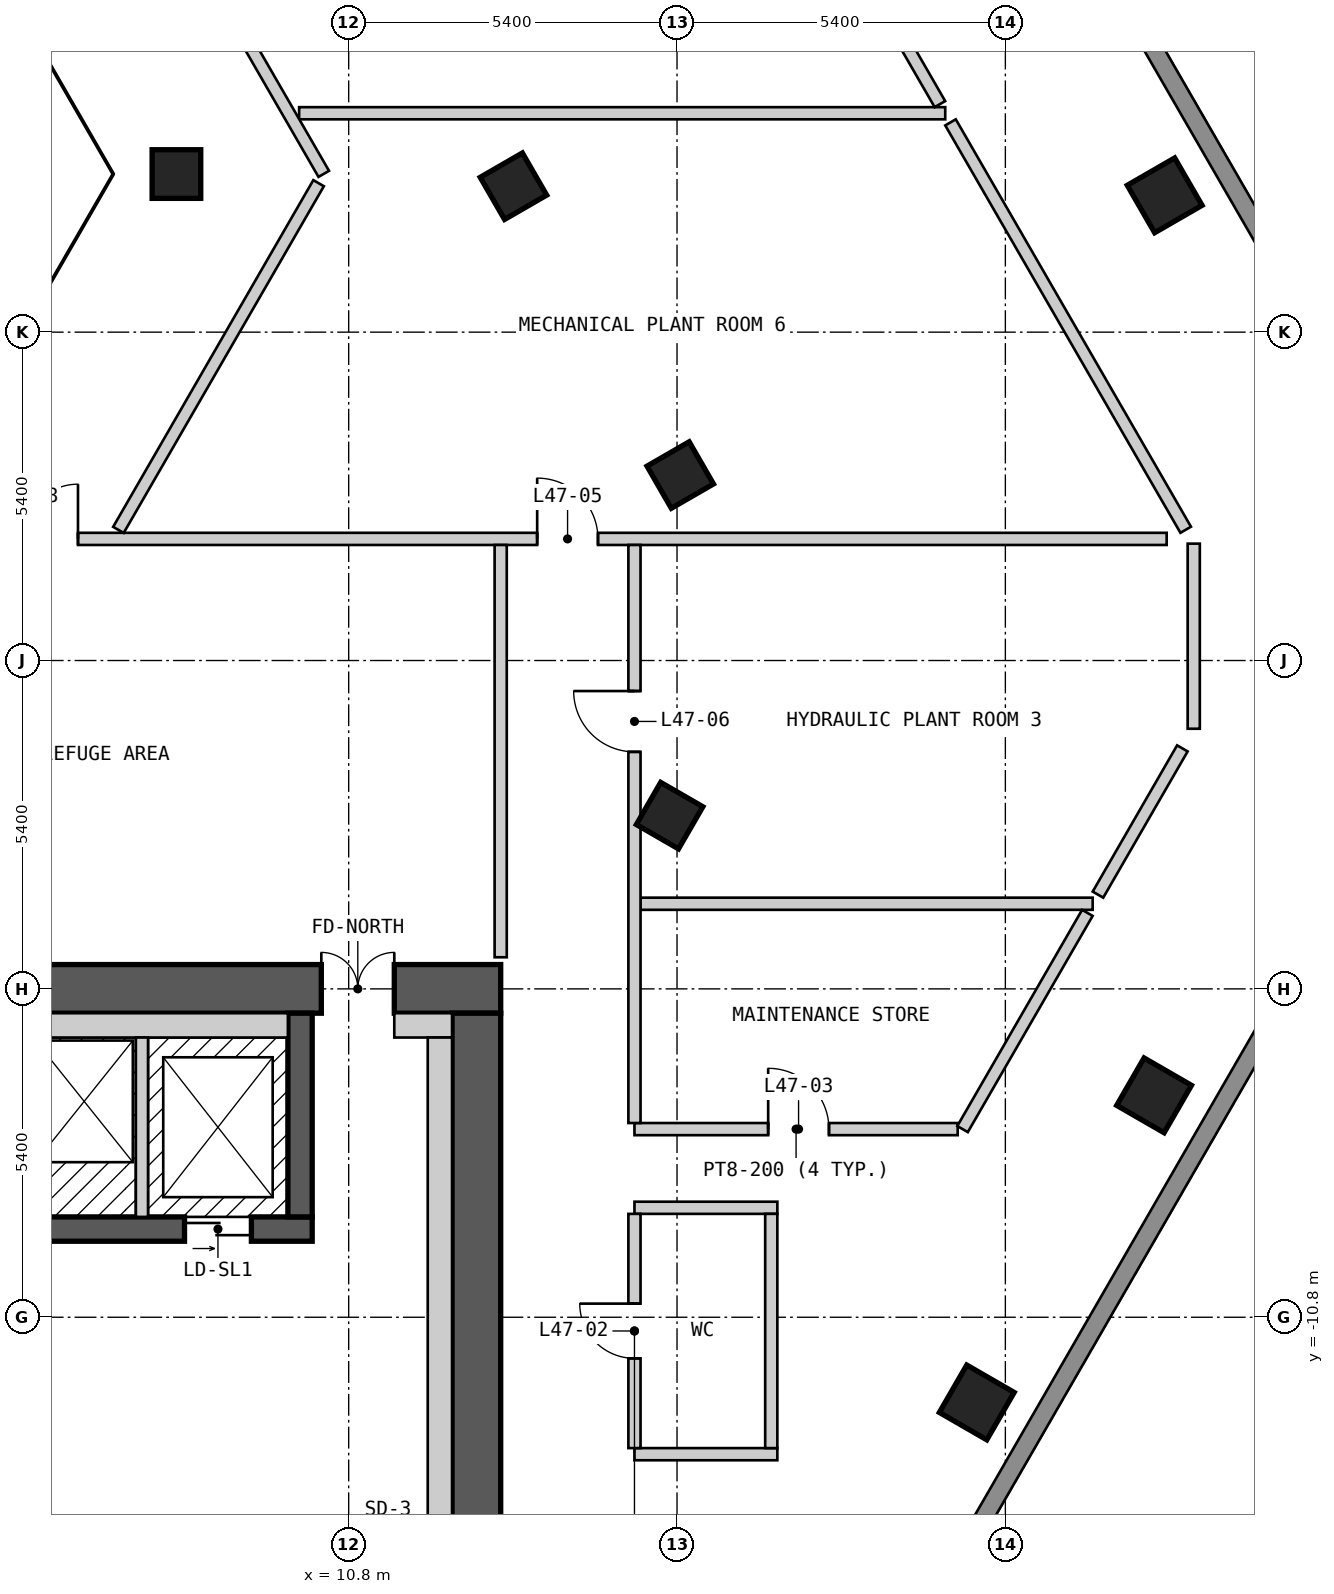
"""IFC4 building model, lengths in metres.
Left out: names, types, materials, properties, quantities, classifications, styles, units other than length and angle.
Written with IfcOpenShell. Run it as: python <this file> out.ifc"""

import sys

from ifc_helpers import new_model, si_unit, direction, frame, frame_2d, origin, origin_2d, place, context, subcontext, project, spatial, polyline, rectangle, outline, extrude, element, fill, save


model = new_model("IFC4")
c1 = context("Model", 3, precision=1e-05, world=origin(), true_north=direction((0.0, 1.0)))
c2 = subcontext(c1, "Body", "Model", "MODEL_VIEW")
j1 = project(units=[si_unit("LENGTHUNIT", "METRE"), si_unit("PLANEANGLEUNIT", "RADIAN")], contexts=[c1])
p1 = place(None, origin())
s1 = spatial("IfcSite", under=j1, at=p1, CompositionType="ELEMENT")
p2 = place(p1, origin())
s2 = spatial("IfcBuilding", under=s1, at=p2, CompositionType="ELEMENT")
p3 = place(p2, frame((0.0, 0.0, 153.6)))
s3 = spatial("IfcBuildingStorey", under=s2, at=p3, CompositionType="ELEMENT", Elevation=153.6)
for number, where, z_axis, x_axis in (
    (1, (21.13, -12.201, 0.0), (0.0, 0.0, 1.0), (0.5, 0.866, 0.0)),
    (2, (24.046, -7.151, 0.0), (0.0, 0.0, 1.0), (0.5, 0.866, 0.0)),
):
    element("IfcColumn", number, at=place(p3, frame(where, z_axis=z_axis, x_axis=x_axis)), inside=s3, PredefinedType="COLUMN", context=c2, shape_type="SweptSolid", body=[
        extrude(rectangle(XDim=0.9, YDim=0.9, at=origin_2d()), origin(), (0.0, 0.0, 1.0), 2.6),
    ])
p4 = place(p3, frame((24.22, 7.65, 0.0), z_axis=(0.0, 0.0, 1.0), x_axis=(-0.5, 0.866025403784, 0.0)))
e3 = element("IfcColumn", 3, at=p4, inside=s3, PredefinedType="COLUMN", context=c2, shape_type="SweptSolid", body=[
    extrude(rectangle(XDim=0.9, YDim=0.9, at=origin_2d()), origin(), (0.0, 0.0, 1.0), 3.6),
])
for number, where, z_axis, x_axis in (
    (4, (16.078, -2.551, 0.0), (0.0, 0.0, 1.0), (0.5, 0.866, 0.0)),
    (5, (16.253, 3.05, 0.0), (0.0, 0.0, 1.0), (-0.5, 0.866, 0.0)),
    (6, (13.51, 7.8, 0.0), (0.0, 0.0, 1.0), (-0.5, 0.866, 0.0)),
    (7, (7.967, 8.0, 0.0), (0.0, 0.0, 1.0), (1.0, 0.0, 0.0)),
):
    element("IfcColumn", number, at=place(p3, frame(where, z_axis=z_axis, x_axis=x_axis)), inside=s3, PredefinedType="COLUMN", context=c2, shape_type="SweptSolid", body=[
        extrude(rectangle(XDim=0.8, YDim=0.8, at=origin_2d()), origin(), (0.0, 0.0, 1.0), 3.6),
    ])
p5 = place(p3, frame((-13.3, -5.4, 0.0), z_axis=(0.0, 0.0, 1.0), x_axis=(1.0, 0.0, 0.0)))
e8 = element("IfcWall", 8, at=p5, inside=s3, PredefinedType="SHEAR", context=c2, shape_type="SweptSolid", body=[
    extrude(rectangle(XDim=26.6, YDim=0.8, at=frame_2d((13.3, 0.0))), origin(), (0.0, 0.0, 1.0), 2.6),
])
p6 = place(p5, frame((23.65, 0.0, 0.0)))
e9 = element("IfcOpeningElement", 9, at=p6, cuts=e8, PredefinedType="OPENING", context=c2, shape_type="SweptSolid", body=[
    extrude(rectangle(XDim=1.2, YDim=2.1, at=frame_2d((0.6, 1.05))), frame((0.0, 0.41, 0.0), z_axis=(0.0, -1.0, 0.0), x_axis=(1.0, 0.0, 0.0)), (0.0, 0.0, 1.0), 0.82),
])
p7 = place(p3, frame((12.9, -18.2, 0.0), z_axis=(0.0, 0.0, 1.0), x_axis=(0.0, 1.0, 0.0)))
e10 = element("IfcWall", 10, at=p7, inside=s3, PredefinedType="SHEAR", context=c2, shape_type="SweptSolid", body=[
    extrude(rectangle(XDim=12.4, YDim=0.8, at=frame_2d((6.2, 0.0))), origin(), (0.0, 0.0, 1.0), 2.6),
])
p8 = place(p3, frame((-12.5, -9.35, 0.0), z_axis=(0.0, 0.0, 1.0), x_axis=(1.0, 0.0, 0.0)))
e11 = element("IfcWall", 11, at=p8, inside=s3, PredefinedType="SHEAR", context=c2, shape_type="SweptSolid", body=[
    extrude(rectangle(XDim=22.7, YDim=0.4, at=frame_2d((11.35, 0.0))), origin(), (0.0, 0.0, 1.0), 2.6),
])
p9 = place(p8, frame((1.1, 0.0, 0.0)))
e12 = element("IfcOpeningElement", 12, at=p9, cuts=e11, PredefinedType="OPENING", context=c2, shape_type="SweptSolid", body=[
    extrude(rectangle(XDim=1.1, YDim=2.1, at=frame_2d((0.55, 1.05))), frame((0.0, 0.21, 0.0), z_axis=(0.0, -1.0, 0.0), x_axis=(1.0, 0.0, 0.0)), (0.0, 0.0, 1.0), 0.42),
])
p10 = place(p8, frame((3.9, 0.0, 0.0)))
e13 = element("IfcOpeningElement", 13, at=p10, cuts=e11, PredefinedType="OPENING", context=c2, shape_type="SweptSolid", body=[
    extrude(rectangle(XDim=1.1, YDim=2.1, at=frame_2d((0.55, 1.05))), frame((0.0, 0.21, 0.0), z_axis=(0.0, -1.0, 0.0), x_axis=(1.0, 0.0, 0.0)), (0.0, 0.0, 1.0), 0.42),
])
p11 = place(p8, frame((20.6, 0.0, 0.0)))
e14 = element("IfcOpeningElement", 14, at=p11, cuts=e11, PredefinedType="OPENING", context=c2, shape_type="SweptSolid", body=[
    extrude(rectangle(XDim=1.1, YDim=2.1, at=frame_2d((0.55, 1.05))), frame((0.0, 0.21, 0.0), z_axis=(0.0, -1.0, 0.0), x_axis=(1.0, 0.0, 0.0)), (0.0, 0.0, 1.0), 0.42),
])
p12 = place(p3, frame((10.0, -9.15, 0.0), z_axis=(0.0, 0.0, 1.0), x_axis=(0.0, 1.0, 0.0)))
e15 = element("IfcWall", 15, at=p12, inside=s3, PredefinedType="SHEAR", context=c2, shape_type="SweptSolid", body=[
    extrude(rectangle(XDim=3.35, YDim=0.4, at=frame_2d((1.675, 0.0))), origin(), (0.0, 0.0, 1.0), 2.6),
])
p13 = place(p3, frame((15.862, -23.425, 0.0), z_axis=(0.0, 0.0, 1.0), x_axis=(0.500017503135, 0.866015298109, 0.0)))
e16 = element("IfcWall", 16, at=p13, inside=s3, PredefinedType="SOLIDWALL", context=c2, shape_type="SweptSolid", body=[
    extrude(outline(polyline([(0.0, -0.15), (24.711, -0.15), (24.631, 0.15), (0.08, 0.15), (0.0, -0.15)])), origin(), (0.0, 0.0, 1.0), 2.6),
])
p14 = place(p3, frame((28.218, 2.825, 0.0), z_axis=(0.0, 0.0, 1.0), x_axis=(-0.500020536353, 0.866013546791, 0.0)))
e17 = element("IfcWall", 17, at=p14, inside=s3, PredefinedType="SOLIDWALL", context=c2, shape_type="SweptSolid", body=[
    extrude(outline(polyline([(0.0, -0.15), (23.325, -0.15), (23.245, 0.15), (0.08, 0.15), (0.0, -0.15)])), origin(), (0.0, 0.0, 1.0), 2.6),
])
for number, where, z_axis, x_axis in (
    (18, (15.5, -13.052, 0.0), (0.0, 0.0, 1.0), (1.0, 0.0, 0.0)),
    (19, (15.5, -9.0, 0.0), (0.0, 0.0, 1.0), (1.0, 0.0, 0.0)),
):
    element("IfcWall", number, at=place(p3, frame(where, z_axis=z_axis, x_axis=x_axis)), inside=s3, PredefinedType="PARTITIONING", context=c2, shape_type="SweptSolid", body=[
        extrude(rectangle(XDim=2.35, YDim=0.2, at=frame_2d((1.175, 0.0))), origin(), (0.0, 0.0, 1.0), 2.6),
    ])
p15 = place(p3, frame((15.5, -7.706, 0.0), z_axis=(0.0, 0.0, 1.0), x_axis=(1.0, 0.0, 0.0)))
e20 = element("IfcWall", 20, at=p15, inside=s3, PredefinedType="PARTITIONING", context=c2, shape_type="SweptSolid", body=[
    extrude(rectangle(XDim=5.316, YDim=0.2, at=frame_2d((2.658, 0.0))), origin(), (0.0, 0.0, 1.0), 2.6),
])
p16 = place(p15, frame((2.199, 0.0, 0.0)))
e21 = element("IfcOpeningElement", 21, at=p16, cuts=e20, PredefinedType="OPENING", context=c2, shape_type="SweptSolid", body=[
    extrude(rectangle(XDim=1.0, YDim=2.1, at=frame_2d((0.5, 1.05))), frame((0.0, 0.11, 0.0), z_axis=(0.0, -1.0, 0.0), x_axis=(1.0, 0.0, 0.0)), (0.0, 0.0, 1.0), 0.22),
])
p17 = place(p3, frame((15.6, -4.0, 0.0), z_axis=(0.0, 0.0, 1.0), x_axis=(1.0, 0.0, 0.0)))
e22 = element("IfcWall", 22, at=p17, inside=s3, PredefinedType="SOLIDWALL", context=c2, shape_type="SweptSolid", body=[
    extrude(rectangle(XDim=7.436, YDim=0.2, at=frame_2d((3.718, 0.0))), origin(), (0.0, 0.0, 1.0), 2.6),
])
p18 = place(p3, frame((-24.253, 2.0, 0.0), z_axis=(0.0, 0.0, 1.0), x_axis=(1.0, 0.0, 0.0)))
e23 = element("IfcWall", 23, at=p18, inside=s3, PredefinedType="SOLIDWALL", context=c2, shape_type="SweptSolid", body=[
    extrude(rectangle(XDim=48.506, YDim=0.2, at=frame_2d((24.253, 0.0))), origin(), (0.0, 0.0, 1.0), 2.6),
])
p19 = place(p18, frame((38.153, 0.0, 0.0)))
e24 = element("IfcOpeningElement", 24, at=p19, cuts=e23, PredefinedType="OPENING", context=c2, shape_type="SweptSolid", body=[
    extrude(rectangle(XDim=1.0, YDim=2.1, at=frame_2d((0.5, 1.05))), frame((0.0, 0.11, 0.0), z_axis=(0.0, -1.0, 0.0), x_axis=(1.0, 0.0, 0.0)), (0.0, 0.0, 1.0), 0.22),
])
p20 = place(p18, frame((28.801, 0.0, 0.0)))
e25 = element("IfcOpeningElement", 25, at=p20, cuts=e23, PredefinedType="OPENING", context=c2, shape_type="SweptSolid", body=[
    extrude(rectangle(XDim=1.8, YDim=2.1, at=frame_2d((0.9, 1.05))), frame((0.0, 0.11, 0.0), z_axis=(0.0, -1.0, 0.0), x_axis=(1.0, 0.0, 0.0)), (0.0, 0.0, 1.0), 0.22),
])
p21 = place(p3, frame((9.985, 9.0, 0.0), z_axis=(0.0, 0.0, 1.0), x_axis=(1.0, 0.0, 0.0)))
e26 = element("IfcWall", 26, at=p21, inside=s3, PredefinedType="SOLIDWALL", context=c2, shape_type="SweptSolid", body=[
    extrude(rectangle(XDim=10.626, YDim=0.2, at=frame_2d((5.313, 0.0))), origin(), (0.0, 0.0, 1.0), 2.6),
])
p22 = place(p3, frame((13.3, -4.88, 0.0), z_axis=(0.0, 0.0, 1.0), x_axis=(0.0, 1.0, 0.0)))
e27 = element("IfcWall", 27, at=p22, inside=s3, PredefinedType="PARTITIONING", context=c2, shape_type="SweptSolid", body=[
    extrude(rectangle(XDim=6.78, YDim=0.2, at=frame_2d((3.39, 0.0))), origin(), (0.0, 0.0, 1.0), 2.6),
])
p23 = place(p3, frame((15.5, -12.952, 0.0), z_axis=(0.0, 0.0, 1.0), x_axis=(0.0, 1.0, 0.0)))
e28 = element("IfcWall", 28, at=p23, inside=s3, PredefinedType="PARTITIONING", context=c2, shape_type="SweptSolid", body=[
    extrude(rectangle(XDim=3.852, YDim=0.2, at=frame_2d((1.926, 0.0))), origin(), (0.0, 0.0, 1.0), 2.6),
])
p24 = place(p23, frame((2.376, 0.0, 0.0), z_axis=(0.0, 0.0, 1.0), x_axis=(-1.0, 0.0, 0.0)))
e29 = element("IfcOpeningElement", 29, at=p24, cuts=e28, PredefinedType="OPENING", context=c2, shape_type="SweptSolid", body=[
    extrude(rectangle(XDim=0.9, YDim=2.1, at=frame_2d((0.45, 1.05))), frame((0.0, 0.11, 0.0), z_axis=(0.0, -1.0, 0.0), x_axis=(1.0, 0.0, 0.0)), (0.0, 0.0, 1.0), 0.22),
])
p25 = place(p3, frame((15.5, -7.606, 0.0), z_axis=(0.0, 0.0, 1.0), x_axis=(0.0, 1.0, 0.0)))
e30 = element("IfcWall", 30, at=p25, inside=s3, PredefinedType="SOLIDWALL", context=c2, shape_type="SweptSolid", body=[
    extrude(rectangle(XDim=9.506, YDim=0.2, at=frame_2d((4.753, 0.0))), origin(), (0.0, 0.0, 1.0), 2.6),
])
p26 = place(p25, frame((7.104, 0.0, 0.0), z_axis=(0.0, 0.0, 1.0), x_axis=(-1.0, 0.0, 0.0)))
e31 = element("IfcOpeningElement", 31, at=p26, cuts=e30, PredefinedType="OPENING", context=c2, shape_type="SweptSolid", body=[
    extrude(rectangle(XDim=1.0, YDim=2.1, at=frame_2d((0.5, 1.05))), frame((0.0, 0.11, 0.0), z_axis=(0.0, -1.0, 0.0), x_axis=(1.0, 0.0, 0.0)), (0.0, 0.0, 1.0), 0.22),
])
p27 = place(p3, frame((17.75, -12.952, 0.0), z_axis=(0.0, 0.0, 1.0), x_axis=(0.0, 1.0, 0.0)))
e32 = element("IfcWall", 32, at=p27, inside=s3, PredefinedType="PARTITIONING", context=c2, shape_type="SweptSolid", body=[
    extrude(rectangle(XDim=3.852, YDim=0.2, at=frame_2d((1.926, 0.0))), origin(), (0.0, 0.0, 1.0), 2.6),
])
p28 = place(p3, frame((24.698, -1.122, 0.0), z_axis=(0.0, 0.0, 1.0), x_axis=(0.0, 1.0, 0.0)))
e33 = element("IfcWall", 33, at=p28, inside=s3, PredefinedType="SOLIDWALL", context=c2, shape_type="SweptSolid", body=[
    extrude(rectangle(XDim=3.044, YDim=0.2, at=frame_2d((1.522, 0.0))), origin(), (0.0, 0.0, 1.0), 2.6),
])
p29 = place(p3, frame((5.196, 17.0, 0.0), z_axis=(0.0, 0.0, 1.0), x_axis=(0.499955721747, -0.866050966336, 0.0)))
e34 = element("IfcWall", 34, at=p29, inside=s3, PredefinedType="SOLIDWALL", context=c2, shape_type="SweptSolid", body=[
    extrude(rectangle(XDim=10.389, YDim=0.2, at=frame_2d((5.194, 0.0))), origin(), (0.0, 0.0, 1.0), 2.6),
])
p30 = place(p3, frame((14.2, 20.105, 0.0), z_axis=(0.0, 0.0, 1.0), x_axis=(0.499944105132, -0.866057672296, 0.0)))
e35 = element("IfcWall", 35, at=p30, inside=s3, PredefinedType="SOLIDWALL", context=c2, shape_type="SweptSolid", body=[
    extrude(rectangle(XDim=12.649, YDim=0.2, at=frame_2d((6.325, 0.0))), origin(), (0.0, 0.0, 1.0), 2.6),
])
p31 = place(p3, frame((20.698, 8.85, 0.0), z_axis=(0.0, 0.0, 1.0), x_axis=(0.499957378818, -0.866050009737, 0.0)))
e36 = element("IfcWall", 36, at=p31, inside=s3, PredefinedType="SOLIDWALL", context=c2, shape_type="SweptSolid", body=[
    extrude(rectangle(XDim=7.737, YDim=0.2, at=frame_2d((3.868, 0.0))), origin(), (0.0, 0.0, 1.0), 2.6),
])
p32 = place(p3, frame((20.896, -7.706, 0.0), z_axis=(0.0, 0.0, 1.0), x_axis=(0.499969497581, 0.866043013648, 0.0)))
e37 = element("IfcWall", 37, at=p32, inside=s3, PredefinedType="PARTITIONING", context=c2, shape_type="SweptSolid", body=[
    extrude(rectangle(XDim=4.106, YDim=0.2, at=frame_2d((2.053, 0.0))), origin(), (0.0, 0.0, 1.0), 2.6),
])
p33 = place(p3, frame((23.123, -3.85, 0.0), z_axis=(0.0, 0.0, 1.0), x_axis=(0.499836620903, 0.866119710204, 0.0)))
e38 = element("IfcWall", 38, at=p33, inside=s3, PredefinedType="SOLIDWALL", context=c2, shape_type="SweptSolid", body=[
    extrude(rectangle(XDim=2.777, YDim=0.2, at=frame_2d((1.388, 0.0))), origin(), (0.0, 0.0, 1.0), 2.6),
])
p34 = place(p3, frame((7.013, 2.148, 0.0), z_axis=(0.0, 0.0, 1.0), x_axis=(0.499983511822, 0.866034923029, 0.0)))
e39 = element("IfcWall", 39, at=p34, inside=s3, PredefinedType="SOLIDWALL", context=c2, shape_type="SweptSolid", body=[
    extrude(rectangle(XDim=6.584, YDim=0.2, at=frame_2d((3.292, 0.0))), origin(), (0.0, 0.0, 1.0), 2.6),
])
p35 = place(p3, frame((-6.3, -6.0, 0.0), z_axis=(0.0, 0.0, 1.0), x_axis=(1.0, 0.0, 0.0)))
e40 = element("IfcWall", 40, at=p35, inside=s3, PredefinedType="SOLIDWALL", context=c2, shape_type="SweptSolid", body=[
    extrude(rectangle(XDim=16.1, YDim=0.4, at=frame_2d((8.05, 0.0))), origin(), (0.0, 0.0, 1.0), 2.6),
])
p36 = place(p3, frame((7.4, -9.15, 0.0), z_axis=(0.0, 0.0, 1.0), x_axis=(0.0, 1.0, 0.0)))
e41 = element("IfcWall", 41, at=p36, inside=s3, PredefinedType="SOLIDWALL", context=c2, shape_type="SweptSolid", body=[
    extrude(rectangle(XDim=2.95, YDim=0.2, at=frame_2d((1.475, 0.0))), origin(), (0.0, 0.0, 1.0), 2.6),
])
p37 = place(p3, frame((11.55, -6.0, 0.0), z_axis=(0.0, 0.0, 1.0), x_axis=(1.0, 0.0, 0.0)))
e42 = element("IfcWall", 42, at=p37, inside=s3, PredefinedType="PARTITIONING", context=c2, shape_type="SweptSolid", body=[
    extrude(rectangle(XDim=0.95, YDim=0.4, at=frame_2d((0.475, 0.0))), origin(), (0.0, 0.0, 1.0), 2.6),
])
p38 = place(p3, frame((12.3, -14.45, 0.0), z_axis=(0.0, 0.0, 1.0), x_axis=(0.0, 1.0, 0.0)))
e43 = element("IfcWall", 43, at=p38, inside=s3, PredefinedType="PARTITIONING", context=c2, shape_type="SweptSolid", body=[
    extrude(rectangle(XDim=8.25, YDim=0.4, at=frame_2d((4.125, 0.0))), origin(), (0.0, 0.0, 1.0), 2.6),
])
p39 = place(p24, origin())
e44 = element("IfcDoor", 44, at=p39, inside=s3, OperationType="SINGLE_SWING_LEFT", PredefinedType="DOOR", context=c2, shape_type="SweptSolid", body=[
    extrude(rectangle(XDim=0.9, YDim=2.1, at=frame_2d((0.45, 1.05))), frame((0.0, 0.025, 0.0), z_axis=(0.0, -1.0, 0.0), x_axis=(1.0, 0.0, 0.0)), (0.0, 0.0, 1.0), 0.05),
])
fill(e29, e44)
p40 = place(p16, origin())
e45 = element("IfcDoor", 45, at=p40, inside=s3, OperationType="SINGLE_SWING_LEFT", PredefinedType="DOOR", context=c2, shape_type="SweptSolid", body=[
    extrude(rectangle(XDim=1.0, YDim=2.1, at=frame_2d((0.5, 1.05))), frame((0.0, 0.025, 0.0), z_axis=(0.0, -1.0, 0.0), x_axis=(1.0, 0.0, 0.0)), (0.0, 0.0, 1.0), 0.05),
])
fill(e21, e45)
p41 = place(p19, origin())
e46 = element("IfcDoor", 46, at=p41, inside=s3, OperationType="SINGLE_SWING_LEFT", PredefinedType="DOOR", context=c2, shape_type="SweptSolid", body=[
    extrude(rectangle(XDim=1.0, YDim=2.1, at=frame_2d((0.5, 1.05))), frame((0.0, 0.025, 0.0), z_axis=(0.0, -1.0, 0.0), x_axis=(1.0, 0.0, 0.0)), (0.0, 0.0, 1.0), 0.05),
])
fill(e24, e46)
p42 = place(p26, origin())
e47 = element("IfcDoor", 47, at=p42, inside=s3, OperationType="SINGLE_SWING_LEFT", PredefinedType="DOOR", context=c2, shape_type="SweptSolid", body=[
    extrude(rectangle(XDim=1.0, YDim=2.1, at=frame_2d((0.5, 1.05))), frame((0.0, 0.025, 0.0), z_axis=(0.0, -1.0, 0.0), x_axis=(1.0, 0.0, 0.0)), (0.0, 0.0, 1.0), 0.05),
])
fill(e31, e47)
p43 = place(p20, origin())
e48 = element("IfcDoor", 48, at=p43, inside=s3, OperationType="DOUBLE_DOOR_SINGLE_SWING", PredefinedType="DOOR", context=c2, shape_type="SweptSolid", body=[
    extrude(rectangle(XDim=1.8, YDim=2.1, at=frame_2d((0.9, 1.05))), frame((0.0, 0.025, 0.0), z_axis=(0.0, -1.0, 0.0), x_axis=(1.0, 0.0, 0.0)), (0.0, 0.0, 1.0), 0.05),
])
fill(e25, e48)
p44 = place(p11, origin())
e49 = element("IfcDoor", 49, at=p44, inside=s3, OperationType="DOUBLE_DOOR_SLIDING", PredefinedType="DOOR", context=c2, shape_type="SweptSolid", body=[
    extrude(rectangle(XDim=1.1, YDim=2.1, at=frame_2d((0.55, 1.05))), frame((0.0, 0.025, 0.0), z_axis=(0.0, -1.0, 0.0), x_axis=(1.0, 0.0, 0.0)), (0.0, 0.0, 1.0), 0.05),
])
fill(e14, e49)
p45 = place(p6, origin())
e50 = element("IfcDoor", 50, at=p45, inside=s3, OperationType="DOUBLE_DOOR_SINGLE_SWING", PredefinedType="DOOR", context=c2, shape_type="SweptSolid", body=[
    extrude(rectangle(XDim=1.2, YDim=2.1, at=frame_2d((0.6, 1.05))), frame((0.0, 0.025, 0.0), z_axis=(0.0, -1.0, 0.0), x_axis=(1.0, 0.0, 0.0)), (0.0, 0.0, 1.0), 0.05),
])
fill(e9, e50)
save(model, sys.argv[1])
